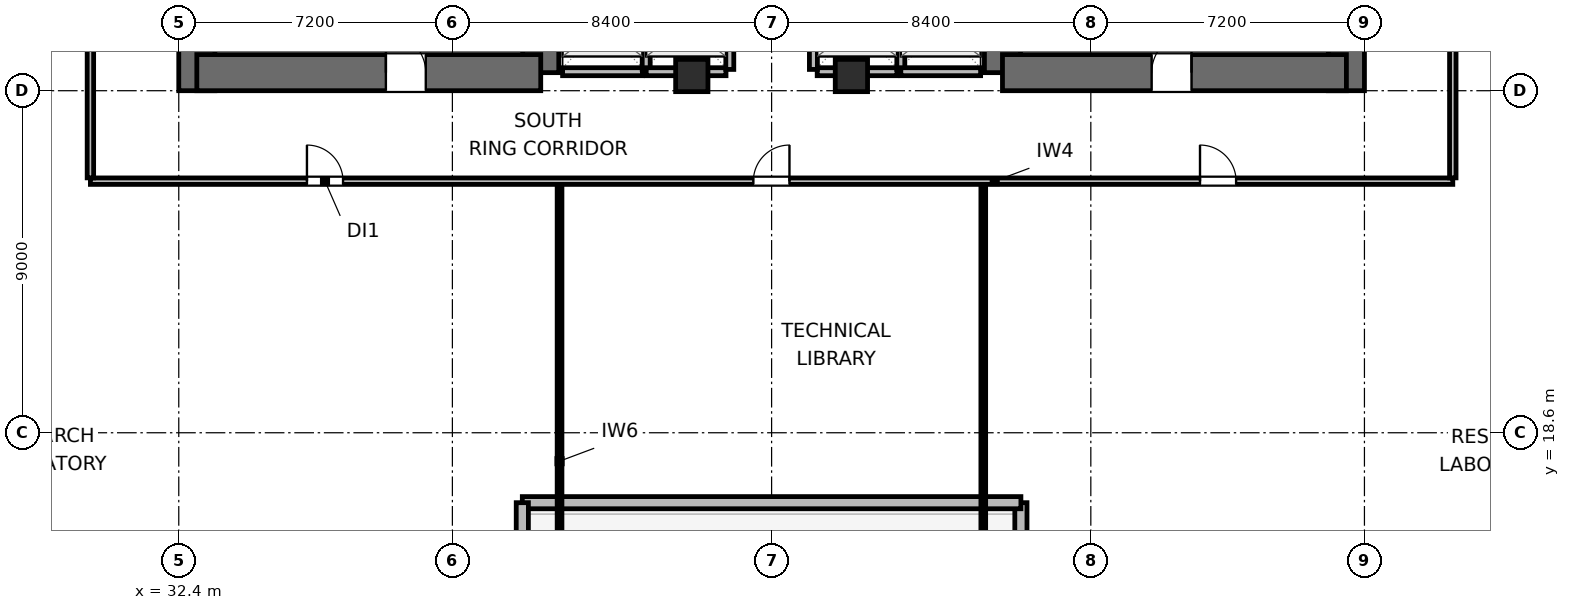
"""IFC4 building model, lengths in metres.
Left out: names, types, materials, properties, quantities, classifications, styles, units other than length and angle.
Written with IfcOpenShell. Run it as: python <this file> out.ifc"""

import sys

from ifc_helpers import new_model, si_unit, direction, frame, frame_2d, origin, origin_2d, place, context, subcontext, project, spatial, rectangle, extrude, element, fill, save


model = new_model("IFC4")
c1 = context("Model", 3, precision=1e-05, world=origin(), true_north=direction((0.0, 1.0)))
c2 = subcontext(c1, "Body", "Model", "MODEL_VIEW")
j1 = project(units=[si_unit("LENGTHUNIT", "METRE"), si_unit("PLANEANGLEUNIT", "RADIAN")], contexts=[c1])
p1 = place(None, origin())
s1 = spatial("IfcSite", under=j1, at=p1, CompositionType="ELEMENT")
p2 = place(p1, origin())
s2 = spatial("IfcBuilding", under=s1, at=p2, CompositionType="ELEMENT")
p3 = place(p2, frame((0.0, 0.0, 68.4)))
s3 = spatial("IfcBuildingStorey", under=s2, at=p3, CompositionType="ELEMENT", Elevation=68.4)
p4 = place(p3, frame((32.875, 27.6, 0.0), z_axis=(0.0, 0.0, 1.0), x_axis=(0.0, 1.0, 0.0)))
e1 = element("IfcWall", 1, at=p4, inside=s3, PredefinedType="SHEAR", context=c2, shape_type="SweptSolid", body=[
    extrude(rectangle(XDim=16.8, YDim=0.95, at=frame_2d((8.4, 0.0))), origin(), (0.0, 0.0, 1.0), 4.5),
])
p5 = place(p3, frame((41.925, 28.075, 0.0), z_axis=(0.0, 0.0, 1.0), x_axis=(0.0, 1.0, 0.0)))
e2 = element("IfcWall", 2, at=p5, inside=s3, PredefinedType="SHEAR", context=c2, shape_type="SweptSolid", body=[
    extrude(rectangle(XDim=6.325, YDim=0.95, at=frame_2d((3.163, 0.0))), origin(), (0.0, 0.0, 1.0), 4.5),
])
p6 = place(p3, frame((32.875, 28.075, 0.0), z_axis=(0.0, 0.0, 1.0), x_axis=(1.0, 0.0, 0.0)))
e3 = element("IfcWall", 3, at=p6, inside=s3, PredefinedType="SHEAR", context=c2, shape_type="SweptSolid", body=[
    extrude(rectangle(XDim=9.05, YDim=0.95, at=frame_2d((4.525, 0.0))), origin(), (0.0, 0.0, 1.0), 4.5),
])
p7 = place(p6, frame((4.975, 0.0, 0.0)))
e4 = element("IfcOpeningElement", 4, at=p7, cuts=e3, PredefinedType="OPENING", context=c2, shape_type="SweptSolid", body=[
    extrude(rectangle(XDim=1.05, YDim=2.04, at=frame_2d((0.525, 1.02))), frame((0.0, 0.485, 0.0), z_axis=(0.0, -1.0, 0.0), x_axis=(1.0, 0.0, 0.0)), (0.0, 0.0, 1.0), 0.97),
])
p8 = place(p3, frame((54.075, 28.075, 0.0), z_axis=(0.0, 0.0, 1.0), x_axis=(0.0, 1.0, 0.0)))
e5 = element("IfcWall", 5, at=p8, inside=s3, PredefinedType="SHEAR", context=c2, shape_type="SweptSolid", body=[
    extrude(rectangle(XDim=7.725, YDim=0.95, at=frame_2d((3.863, 0.0))), origin(), (0.0, 0.0, 1.0), 4.5),
])
p9 = place(p3, frame((63.125, 27.6, 0.0), z_axis=(0.0, 0.0, 1.0), x_axis=(0.0, 1.0, 0.0)))
e6 = element("IfcWall", 6, at=p9, inside=s3, PredefinedType="SHEAR", context=c2, shape_type="SweptSolid", body=[
    extrude(rectangle(XDim=16.8, YDim=0.95, at=frame_2d((8.4, 0.0))), origin(), (0.0, 0.0, 1.0), 4.5),
])
p10 = place(p3, frame((54.075, 28.075, 0.0), z_axis=(0.0, 0.0, 1.0), x_axis=(1.0, 0.0, 0.0)))
e7 = element("IfcWall", 7, at=p10, inside=s3, PredefinedType="SHEAR", context=c2, shape_type="SweptSolid", body=[
    extrude(rectangle(XDim=9.05, YDim=0.95, at=frame_2d((4.525, 0.0))), origin(), (0.0, 0.0, 1.0), 4.5),
])
p11 = place(p10, frame((3.925, 0.0, 0.0)))
e8 = element("IfcOpeningElement", 8, at=p11, cuts=e7, PredefinedType="OPENING", context=c2, shape_type="SweptSolid", body=[
    extrude(rectangle(XDim=1.05, YDim=2.04, at=frame_2d((0.525, 1.02))), frame((0.0, 0.485, 0.0), z_axis=(0.0, -1.0, 0.0), x_axis=(1.0, 0.0, 0.0)), (0.0, 0.0, 1.0), 0.97),
])
for number, where, z_axis, x_axis in (
    (9, (45.9, 28.0, 0.0), (0.0, 0.0, 1.0), (1.0, 0.0, 0.0)),
    (10, (50.1, 28.0, 0.0), (0.0, 0.0, 1.0), (1.0, 0.0, 0.0)),
):
    element("IfcColumn", number, at=place(p3, frame(where, z_axis=z_axis, x_axis=x_axis)), inside=s3, PredefinedType="COLUMN", context=c2, shape_type="SweptSolid", body=[
        extrude(rectangle(XDim=0.85, YDim=0.85, at=origin_2d()), origin(), (0.0, 0.0, 1.0), 4.5),
    ])
p12 = place(p3, frame((54.56, 11.04, 0.0), z_axis=(0.0, 0.0, 1.0), x_axis=(0.0, 1.0, 0.0)))
e11 = element("IfcWall", 11, at=p12, inside=s3, PredefinedType="SOLIDWALL", context=c2, shape_type="SweptSolid", body=[
    extrude(rectangle(XDim=5.72, YDim=0.32, at=frame_2d((2.86, 0.0))), origin(), (0.0, 0.0, 1.0), 3.475),
])
p13 = place(p12, frame((1.96, 0.0, 0.0)))
e12 = element("IfcOpeningElement", 12, at=p13, cuts=e11, PredefinedType="OPENING", context=c2, shape_type="SweptSolid", body=[
    extrude(rectangle(XDim=1.8, YDim=2.1, at=frame_2d((0.9, 1.05))), frame((0.0, 0.17, 0.0), z_axis=(0.0, -1.0, 0.0), x_axis=(1.0, 0.0, 0.0)), (0.0, 0.0, 1.0), 0.34),
])
p14 = place(p3, frame((54.56, 16.76, 0.0), z_axis=(0.0, 0.0, 1.0), x_axis=(-1.0, 0.0, 0.0)))
e13 = element("IfcWall", 13, at=p14, inside=s3, PredefinedType="SOLIDWALL", context=c2, shape_type="SweptSolid", body=[
    extrude(rectangle(XDim=13.12, YDim=0.32, at=frame_2d((6.56, 0.0))), origin(), (0.0, 0.0, 1.0), 3.53),
])
p15 = place(p3, frame((41.44, 16.76, 0.0), z_axis=(0.0, 0.0, 1.0), x_axis=(0.0, -1.0, 0.0)))
e14 = element("IfcWall", 14, at=p15, inside=s3, PredefinedType="SOLIDWALL", context=c2, shape_type="SweptSolid", body=[
    extrude(rectangle(XDim=5.72, YDim=0.32, at=frame_2d((2.86, 0.0))), origin(), (0.0, 0.0, 1.0), 3.475),
])
p16 = place(p3, frame((42.5, 28.1, 0.0), z_axis=(0.0, 0.0, 1.0), x_axis=(1.0, 0.0, 0.0)))
e15 = element("IfcWall", 15, at=p16, inside=s3, PredefinedType="PARTITIONING", context=c2, shape_type="SweptSolid", body=[
    extrude(rectangle(XDim=2.1, YDim=0.21, at=frame_2d((1.05, 0.0))), origin(), (0.0, 0.0, 1.0), 3.125),
])
p17 = place(p3, frame((44.7, 28.16, 0.0), z_axis=(0.0, 0.0, 1.0), x_axis=(0.0, 1.0, 0.0)))
e16 = element("IfcWall", 16, at=p17, inside=s3, PredefinedType="PARTITIONING", context=c2, shape_type="SweptSolid", body=[
    extrude(rectangle(XDim=2.28, YDim=0.21, at=frame_2d((1.14, 0.0))), origin(), (0.0, 0.0, 1.0), 4.24),
])
p18 = place(p3, frame((44.7, 28.1, 0.0), z_axis=(0.0, 0.0, 1.0), x_axis=(1.0, 0.0, 0.0)))
e17 = element("IfcWall", 17, at=p18, inside=s3, PredefinedType="PARTITIONING", context=c2, shape_type="SweptSolid", body=[
    extrude(rectangle(XDim=2.1, YDim=0.21, at=frame_2d((1.05, 0.0))), origin(), (0.0, 0.0, 1.0), 3.125),
])
p19 = place(p3, frame((46.9, 28.16, 0.0), z_axis=(0.0, 0.0, 1.0), x_axis=(0.0, 1.0, 0.0)))
e18 = element("IfcWall", 18, at=p19, inside=s3, PredefinedType="PARTITIONING", context=c2, shape_type="SweptSolid", body=[
    extrude(rectangle(XDim=2.28, YDim=0.21, at=frame_2d((1.14, 0.0))), origin(), (0.0, 0.0, 1.0), 4.24),
])
p20 = place(p3, frame((49.2, 28.1, 0.0), z_axis=(0.0, 0.0, 1.0), x_axis=(1.0, 0.0, 0.0)))
e19 = element("IfcWall", 19, at=p20, inside=s3, PredefinedType="PARTITIONING", context=c2, shape_type="SweptSolid", body=[
    extrude(rectangle(XDim=2.1, YDim=0.21, at=frame_2d((1.05, 0.0))), origin(), (0.0, 0.0, 1.0), 3.125),
])
for number, where, z_axis, x_axis in (
    (20, (49.1, 28.16, 0.0), (0.0, 0.0, 1.0), (0.0, 1.0, 0.0)),
    (21, (51.4, 28.16, 0.0), (0.0, 0.0, 1.0), (0.0, 1.0, 0.0)),
):
    element("IfcWall", number, at=place(p3, frame(where, z_axis=z_axis, x_axis=x_axis)), inside=s3, PredefinedType="PARTITIONING", context=c2, shape_type="SweptSolid", body=[
        extrude(rectangle(XDim=2.28, YDim=0.21, at=frame_2d((1.14, 0.0))), origin(), (0.0, 0.0, 1.0), 4.24),
    ])
p21 = place(p3, frame((51.4, 28.1, 0.0), z_axis=(0.0, 0.0, 1.0), x_axis=(1.0, 0.0, 0.0)))
e22 = element("IfcWall", 22, at=p21, inside=s3, PredefinedType="PARTITIONING", context=c2, shape_type="SweptSolid", body=[
    extrude(rectangle(XDim=2.1, YDim=0.21, at=frame_2d((1.05, 0.0))), origin(), (0.0, 0.0, 1.0), 3.125),
])
p22 = place(p3, frame((30.075, 25.22, 0.0), z_axis=(0.0, 0.0, 1.0), x_axis=(1.0, 0.0, 0.0)))
e23 = element("IfcWall", 23, at=p22, inside=s3, PredefinedType="PARTITIONING", context=c2, shape_type="SweptSolid", body=[
    extrude(rectangle(XDim=35.85, YDim=0.17, at=frame_2d((17.925, 0.0))), origin(), (0.0, 0.0, 1.0), 4.24),
])
p23 = place(p22, frame((5.698, 0.0, 0.0)))
e24 = element("IfcOpeningElement", 24, at=p23, cuts=e23, PredefinedType="OPENING", context=c2, shape_type="SweptSolid", body=[
    extrude(rectangle(XDim=0.95, YDim=2.04, at=frame_2d((0.475, 1.02))), frame((0.0, 0.095, 0.0), z_axis=(0.0, -1.0, 0.0), x_axis=(1.0, 0.0, 0.0)), (0.0, 0.0, 1.0), 0.19),
])
p24 = place(p22, frame((17.445, 0.0, 0.0)))
e25 = element("IfcOpeningElement", 25, at=p24, cuts=e23, PredefinedType="OPENING", context=c2, shape_type="SweptSolid", body=[
    extrude(rectangle(XDim=0.95, YDim=2.04, at=frame_2d((0.475, 1.02))), frame((0.0, 0.095, 0.0), z_axis=(0.0, -1.0, 0.0), x_axis=(1.0, 0.0, 0.0)), (0.0, 0.0, 1.0), 0.19),
])
p25 = place(p22, frame((29.198, 0.0, 0.0)))
e26 = element("IfcOpeningElement", 26, at=p25, cuts=e23, PredefinedType="OPENING", context=c2, shape_type="SweptSolid", body=[
    extrude(rectangle(XDim=0.95, YDim=2.04, at=frame_2d((0.475, 1.02))), frame((0.0, 0.095, 0.0), z_axis=(0.0, -1.0, 0.0), x_axis=(1.0, 0.0, 0.0)), (0.0, 0.0, 1.0), 0.19),
])
p26 = place(p3, frame((30.075, 25.307, 0.0), z_axis=(0.0, 0.0, 1.0), x_axis=(0.0, 1.0, 0.0)))
e27 = element("IfcWall", 27, at=p26, inside=s3, PredefinedType="PARTITIONING", context=c2, shape_type="SweptSolid", body=[
    extrude(rectangle(XDim=21.386, YDim=0.17, at=frame_2d((10.693, 0.0))), origin(), (0.0, 0.0, 1.0), 4.24),
])
p27 = place(p26, frame((3.528, 0.0, 0.0)))
e28 = element("IfcOpeningElement", 28, at=p27, cuts=e27, PredefinedType="OPENING", context=c2, shape_type="SweptSolid", body=[
    extrude(rectangle(XDim=0.95, YDim=2.04, at=frame_2d((0.475, 1.02))), frame((0.0, 0.095, 0.0), z_axis=(0.0, -1.0, 0.0), x_axis=(1.0, 0.0, 0.0)), (0.0, 0.0, 1.0), 0.19),
])
p28 = place(p26, frame((10.818, 0.0, 0.0)))
e29 = element("IfcOpeningElement", 29, at=p28, cuts=e27, PredefinedType="OPENING", context=c2, shape_type="SweptSolid", body=[
    extrude(rectangle(XDim=0.95, YDim=2.04, at=frame_2d((0.475, 1.02))), frame((0.0, 0.095, 0.0), z_axis=(0.0, -1.0, 0.0), x_axis=(1.0, 0.0, 0.0)), (0.0, 0.0, 1.0), 0.19),
])
p29 = place(p26, frame((17.508, 0.0, 0.0)))
e30 = element("IfcOpeningElement", 30, at=p29, cuts=e27, PredefinedType="OPENING", context=c2, shape_type="SweptSolid", body=[
    extrude(rectangle(XDim=0.95, YDim=2.04, at=frame_2d((0.475, 1.02))), frame((0.0, 0.095, 0.0), z_axis=(0.0, -1.0, 0.0), x_axis=(1.0, 0.0, 0.0)), (0.0, 0.0, 1.0), 0.19),
])
p30 = place(p3, frame((65.925, 25.307, 0.0), z_axis=(0.0, 0.0, 1.0), x_axis=(0.0, 1.0, 0.0)))
e31 = element("IfcWall", 31, at=p30, inside=s3, PredefinedType="PARTITIONING", context=c2, shape_type="SweptSolid", body=[
    extrude(rectangle(XDim=21.386, YDim=0.17, at=frame_2d((10.693, 0.0))), origin(), (0.0, 0.0, 1.0), 4.24),
])
p31 = place(p30, frame((4.328, 0.0, 0.0)))
e32 = element("IfcOpeningElement", 32, at=p31, cuts=e31, PredefinedType="OPENING", context=c2, shape_type="SweptSolid", body=[
    extrude(rectangle(XDim=0.95, YDim=2.04, at=frame_2d((0.475, 1.02))), frame((0.0, 0.095, 0.0), z_axis=(0.0, -1.0, 0.0), x_axis=(1.0, 0.0, 0.0)), (0.0, 0.0, 1.0), 0.19),
])
p32 = place(p30, frame((15.108, 0.0, 0.0)))
e33 = element("IfcOpeningElement", 33, at=p32, cuts=e31, PredefinedType="OPENING", context=c2, shape_type="SweptSolid", body=[
    extrude(rectangle(XDim=0.95, YDim=2.04, at=frame_2d((0.475, 1.02))), frame((0.0, 0.095, 0.0), z_axis=(0.0, -1.0, 0.0), x_axis=(1.0, 0.0, 0.0)), (0.0, 0.0, 1.0), 0.19),
])
p33 = place(p3, frame((42.42, 10.57, 0.0), z_axis=(0.0, 0.0, 1.0), x_axis=(0.0, 1.0, 0.0)))
e34 = element("IfcWall", 34, at=p33, inside=s3, PredefinedType="PARTITIONING", context=c2, shape_type="SweptSolid", body=[
    extrude(rectangle(XDim=14.563, YDim=0.125, at=frame_2d((7.281, 0.0))), origin(), (0.0, 0.0, 1.0), 3.603),
])
p34 = place(p3, frame((53.57, 10.577, 0.0), z_axis=(0.0, 0.0, 1.0), x_axis=(0.0, 1.0, 0.0)))
e35 = element("IfcWall", 35, at=p34, inside=s3, PredefinedType="PARTITIONING", context=c2, shape_type="SweptSolid", body=[
    extrude(rectangle(XDim=14.556, YDim=0.125, at=frame_2d((7.278, 0.0))), origin(), (0.0, 0.0, 1.0), 3.603),
])
p35 = place(p7, origin())
e36 = element("IfcDoor", 36, at=p35, inside=s3, OperationType="SINGLE_SWING_LEFT", PredefinedType="DOOR", context=c2, shape_type="SweptSolid", body=[
    extrude(rectangle(XDim=1.05, YDim=2.04, at=frame_2d((0.525, 1.02))), frame((0.0, 0.025, 0.0), z_axis=(0.0, -1.0, 0.0), x_axis=(1.0, 0.0, 0.0)), (0.0, 0.0, 1.0), 0.05),
])
fill(e4, e36)
p36 = place(p11, origin())
e37 = element("IfcDoor", 37, at=p36, inside=s3, OperationType="SINGLE_SWING_RIGHT", PredefinedType="DOOR", context=c2, shape_type="SweptSolid", body=[
    extrude(rectangle(XDim=1.05, YDim=2.04, at=frame_2d((0.525, 1.02))), frame((0.0, 0.025, 0.0), z_axis=(0.0, -1.0, 0.0), x_axis=(1.0, 0.0, 0.0)), (0.0, 0.0, 1.0), 0.05),
])
fill(e8, e37)
p37 = place(p23, origin())
e38 = element("IfcDoor", 38, at=p37, inside=s3, OperationType="SINGLE_SWING_LEFT", PredefinedType="DOOR", context=c2, shape_type="SweptSolid", body=[
    extrude(rectangle(XDim=0.95, YDim=2.04, at=frame_2d((0.475, 1.02))), frame((0.0, 0.025, 0.0), z_axis=(0.0, -1.0, 0.0), x_axis=(1.0, 0.0, 0.0)), (0.0, 0.0, 1.0), 0.05),
])
fill(e24, e38)
p38 = place(p24, origin())
e39 = element("IfcDoor", 39, at=p38, inside=s3, OperationType="SINGLE_SWING_RIGHT", PredefinedType="DOOR", context=c2, shape_type="SweptSolid", body=[
    extrude(rectangle(XDim=0.95, YDim=2.04, at=frame_2d((0.475, 1.02))), frame((0.0, 0.025, 0.0), z_axis=(0.0, -1.0, 0.0), x_axis=(1.0, 0.0, 0.0)), (0.0, 0.0, 1.0), 0.05),
])
fill(e25, e39)
p39 = place(p25, origin())
e40 = element("IfcDoor", 40, at=p39, inside=s3, OperationType="SINGLE_SWING_LEFT", PredefinedType="DOOR", context=c2, shape_type="SweptSolid", body=[
    extrude(rectangle(XDim=0.95, YDim=2.04, at=frame_2d((0.475, 1.02))), frame((0.0, 0.025, 0.0), z_axis=(0.0, -1.0, 0.0), x_axis=(1.0, 0.0, 0.0)), (0.0, 0.0, 1.0), 0.05),
])
fill(e26, e40)
save(model, sys.argv[1])
